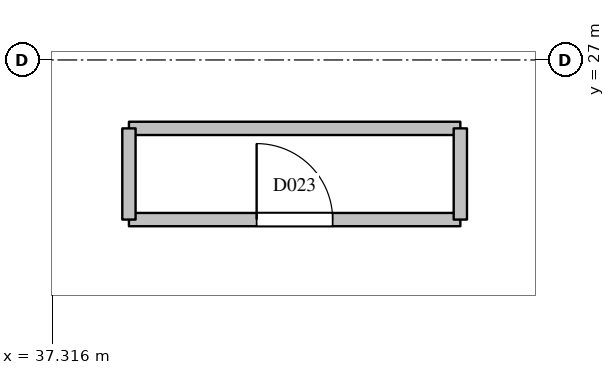
"""IFC4 building model, lengths in metres.
Left out: names, types, materials, properties, quantities, classifications, styles, units other than length and angle.
Written with IfcOpenShell. Run it as: python <this file> out.ifc"""

import sys

from ifc_helpers import new_model, si_unit, direction, frame, frame_2d, origin, place, context, subcontext, project, spatial, rectangle, extrude, element, fill, save


model = new_model("IFC4")
c1 = context("Model", 3, precision=1e-05, world=origin(), true_north=direction((0.0, 1.0)))
c2 = subcontext(c1, "Body", "Model", "MODEL_VIEW")
j1 = project(units=[si_unit("LENGTHUNIT", "METRE"), si_unit("PLANEANGLEUNIT", "RADIAN")], contexts=[c1])
p1 = place(None, origin())
s1 = spatial("IfcSite", under=j1, at=p1, CompositionType="ELEMENT")
p2 = place(p1, origin())
s2 = spatial("IfcBuilding", under=s1, at=p2, CompositionType="ELEMENT")
p3 = place(p2, frame((0.0, 0.0, 50.0)))
s3 = spatial("IfcBuildingStorey", under=s2, at=p3, CompositionType="ELEMENT", Elevation=50.0)
p4 = place(p3, frame((38.32, 24.9, 0.0), z_axis=(0.0, 0.0, 1.0), x_axis=(1.0, 0.0, 0.0)))
e1 = element("IfcWall", 1, at=p4, inside=s3, PredefinedType="PARTITIONING", context=c2, shape_type="SweptSolid", body=[
    extrude(rectangle(XDim=4.36, YDim=0.175, at=frame_2d((2.18, 0.0))), origin(), (0.0, 0.0, 1.0), 3.5),
])
p5 = place(p4, frame((1.68, 0.0, 0.0)))
e2 = element("IfcOpeningElement", 2, at=p5, cuts=e1, PredefinedType="OPENING", context=c2, shape_type="SweptSolid", body=[
    extrude(rectangle(XDim=1.0, YDim=2.1, at=frame_2d((0.5, 1.05))), frame((0.0, 0.097, 0.0), z_axis=(0.0, -1.0, 0.0), x_axis=(1.0, 0.0, 0.0)), (0.0, 0.0, 1.0), 0.195),
])
p6 = place(p3, frame((38.32, 26.1, 0.0), z_axis=(0.0, 0.0, 1.0), x_axis=(1.0, 0.0, 0.0)))
e3 = element("IfcWall", 3, at=p6, inside=s3, PredefinedType="PARTITIONING", context=c2, shape_type="SweptSolid", body=[
    extrude(rectangle(XDim=4.36, YDim=0.175, at=frame_2d((2.18, 0.0))), origin(), (0.0, 0.0, 1.0), 3.5),
])
for number, where, z_axis, x_axis in (
    (4, (38.32, 24.9, 0.0), (0.0, 0.0, 1.0), (0.0, 1.0, 0.0)),
    (5, (42.68, 24.9, 0.0), (0.0, 0.0, 1.0), (0.0, 1.0, 0.0)),
):
    element("IfcWall", number, at=place(p3, frame(where, z_axis=z_axis, x_axis=x_axis)), inside=s3, PredefinedType="PARTITIONING", context=c2, shape_type="SweptSolid", body=[
        extrude(rectangle(XDim=1.2, YDim=0.175, at=frame_2d((0.6, 0.0))), origin(), (0.0, 0.0, 1.0), 3.5),
    ])
p7 = place(p5, origin())
e6 = element("IfcDoor", 6, at=p7, inside=s3, OperationType="SINGLE_SWING_LEFT", PredefinedType="DOOR", context=c2, shape_type="SweptSolid", body=[
    extrude(rectangle(XDim=1.0, YDim=2.1, at=frame_2d((0.5, 1.05))), frame((0.0, 0.025, 0.0), z_axis=(0.0, -1.0, 0.0), x_axis=(1.0, 0.0, 0.0)), (0.0, 0.0, 1.0), 0.05),
])
fill(e2, e6)
save(model, sys.argv[1])
